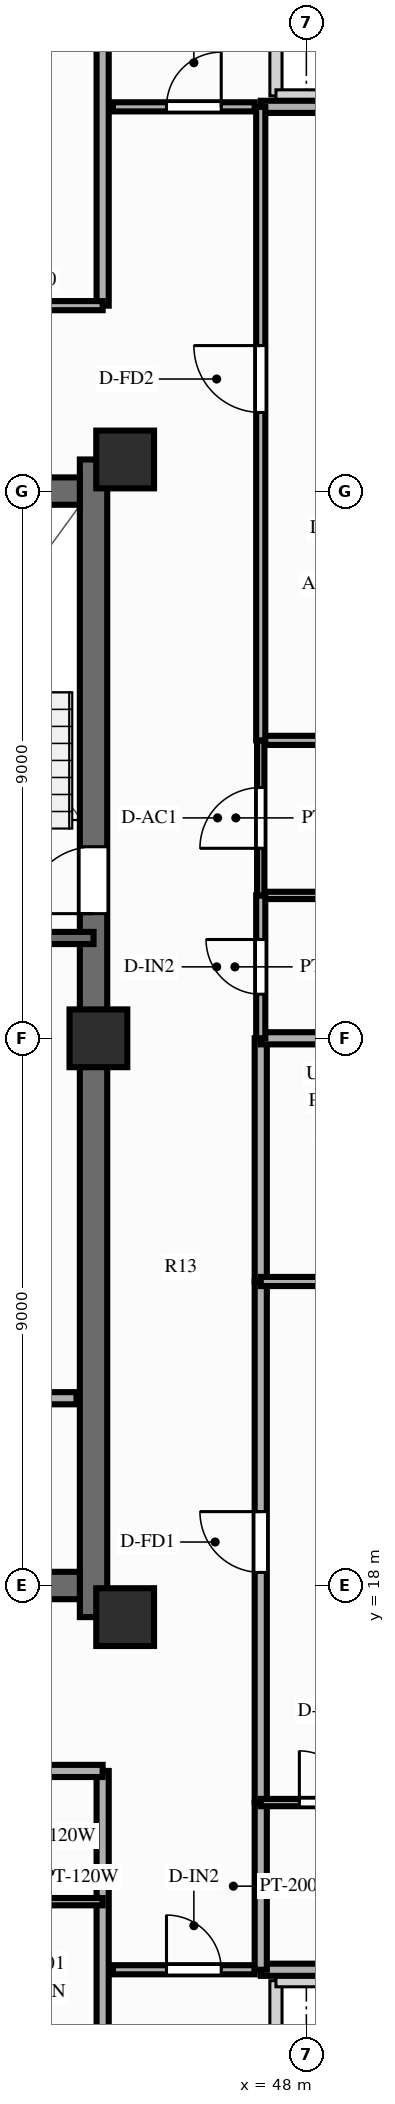
"""IFC4 building model, lengths in metres.
Left out: names, types, materials, properties, quantities, classifications, styles, units other than length and angle.
Written with IfcOpenShell. Run it as: python <this file> out.ifc"""

import sys

from ifc_helpers import new_model, si_unit, direction, frame, frame_2d, origin, origin_2d, place, context, subcontext, project, spatial, rectangle, extrude, source, transform, mapped, element, fill, save


model = new_model("IFC4")
c1 = context("Model", 3, precision=1e-05, world=origin(), true_north=direction((0.0, 1.0)))
c2 = subcontext(c1, "Body", "Model", "MODEL_VIEW")
j1 = project(units=[si_unit("LENGTHUNIT", "METRE"), si_unit("PLANEANGLEUNIT", "RADIAN")], contexts=[c1])
p1 = place(None, origin())
s1 = spatial("IfcSite", under=j1, at=p1, CompositionType="ELEMENT")
p2 = place(p1, origin())
s2 = spatial("IfcBuilding", under=s1, at=p2, CompositionType="ELEMENT")
p3 = place(p2, frame((0.0, 0.0, 246.0)))
s3 = spatial("IfcBuildingStorey", under=s2, at=p3, CompositionType="ELEMENT", Elevation=246.0)
p4 = place(p3, frame((44.5, 17.48, 0.0), z_axis=(0.0, 0.0, 1.0), x_axis=(0.0, 1.0, 0.0)))
e1 = element("IfcWall", 1, at=p4, inside=s3, PredefinedType="SHEAR", context=c2, shape_type="SweptSolid", body=[
    extrude(rectangle(XDim=19.04, YDim=0.45, at=frame_2d((9.52, 0.0))), origin(), (0.0, 0.0, 1.0), 3.0),
])
p5 = place(p4, frame((12.67, 0.0, 0.0), z_axis=(0.0, 0.0, 1.0), x_axis=(-1.0, 0.0, 0.0)))
e2 = element("IfcOpeningElement", 2, at=p5, cuts=e1, PredefinedType="OPENING", context=c2, shape_type="SweptSolid", body=[
    extrude(rectangle(XDim=1.1, YDim=2.15, at=frame_2d((0.55, 1.075))), frame((0.0, 0.237, 0.0), z_axis=(0.0, -1.0, 0.0), x_axis=(1.0, 0.0, 0.0)), (0.0, 0.0, 1.0), 0.474),
])
p6 = place(p3, frame((31.725, 18.0, 0.0), z_axis=(0.0, 0.0, 1.0), x_axis=(1.0, 0.0, 0.0)))
e3 = element("IfcWall", 3, at=p6, inside=s3, PredefinedType="SHEAR", context=c2, shape_type="SweptSolid", body=[
    extrude(rectangle(XDim=12.55, YDim=0.45, at=frame_2d((6.275, 0.0))), origin(), (0.0, 0.0, 1.0), 3.0),
])
p7 = place(p3, frame((31.725, 36.0, 0.0), z_axis=(0.0, 0.0, 1.0), x_axis=(1.0, 0.0, 0.0)))
e4 = element("IfcWall", 4, at=p7, inside=s3, PredefinedType="SHEAR", context=c2, shape_type="SweptSolid", body=[
    extrude(rectangle(XDim=12.55, YDim=0.45, at=frame_2d((6.275, 0.0))), origin(), (0.0, 0.0, 1.0), 3.0),
])
p8 = place(p7, frame((5.225, 0.0, 0.0), z_axis=(0.0, 0.0, 1.0), x_axis=(-1.0, 0.0, 0.0)))
e5 = element("IfcOpeningElement", 5, at=p8, cuts=e4, PredefinedType="OPENING", context=c2, shape_type="SweptSolid", body=[
    extrude(rectangle(XDim=1.4, YDim=2.15, at=frame_2d((0.7, 1.075))), frame((0.0, 0.237, 0.0), z_axis=(0.0, -1.0, 0.0), x_axis=(1.0, 0.0, 0.0)), (0.0, 0.0, 1.0), 0.474),
])
m1 = source(origin(), c2, "Body", "SweptSolid", [
    extrude(rectangle(XDim=0.95, YDim=0.95, at=origin_2d()), origin(), (0.0, 0.0, 1.0), 3.0),
])
for number, where, z_axis, x_axis in (
    (6, (45.02, 17.48, 0.0), (0.0, 0.0, 1.0), (1.0, 0.0, 0.0)),
    (7, (45.02, 36.52, 0.0), (0.0, 0.0, 1.0), (1.0, 0.0, 0.0)),
    (8, (44.58, 27.0, 0.0), (0.0, 0.0, 1.0), (1.0, 0.0, 0.0)),
):
    element("IfcColumn", number, at=place(p3, frame(where, z_axis=z_axis, x_axis=x_axis)), inside=s3, PredefinedType="COLUMN", context=c2, shape_type="MappedRepresentation", body=[
        mapped(m1, transform((0.0, 0.0, 0.0), scale=1.0)),
    ])
p9 = place(p3, frame((42.88, 21.08, 0.0), z_axis=(0.0, 0.0, 1.0), x_axis=(1.0, 0.0, 0.0)))
e9 = element("IfcWall", 9, at=p9, inside=s3, PredefinedType="PARTITIONING", context=c2, shape_type="SweptSolid", body=[
    extrude(rectangle(XDim=1.34, YDim=0.2, at=frame_2d((0.67, 0.0))), origin(), (0.0, 0.0, 1.0), 2.74),
])
p10 = place(p3, frame((40.57, 28.65, 0.0), z_axis=(0.0, 0.0, 1.0), x_axis=(1.0, 0.0, 0.0)))
e10 = element("IfcWall", 10, at=p10, inside=s3, PredefinedType="SOLIDWALL", context=c2, shape_type="SweptSolid", body=[
    extrude(rectangle(XDim=3.93, YDim=0.2, at=frame_2d((1.965, 0.0))), origin(), (0.0, 0.0, 1.0), 2.74),
])
p11 = place(p3, frame((44.82, 11.68, 0.0), z_axis=(0.0, 0.0, 1.0), x_axis=(1.0, 0.0, 0.0)))
e11 = element("IfcWall", 11, at=p11, inside=s3, PredefinedType="PARTITIONING", context=c2, shape_type="SweptSolid", body=[
    extrude(rectangle(XDim=2.33, YDim=0.15, at=frame_2d((1.165, 0.0))), origin(), (0.0, 0.0, 1.0), 2.74),
])
p12 = place(p11, frame((0.88, 0.0, 0.0)))
e12 = element("IfcOpeningElement", 12, at=p12, cuts=e11, PredefinedType="OPENING", context=c2, shape_type="SweptSolid", body=[
    extrude(rectangle(XDim=0.9, YDim=2.1, at=frame_2d((0.45, 1.05))), frame((0.0, 0.087, 0.0), z_axis=(0.0, -1.0, 0.0), x_axis=(1.0, 0.0, 0.0)), (0.0, 0.0, 1.0), 0.174),
])
p13 = place(p3, frame((44.82, 42.32, 0.0), z_axis=(0.0, 0.0, 1.0), x_axis=(1.0, 0.0, 0.0)))
e13 = element("IfcWall", 13, at=p13, inside=s3, PredefinedType="PARTITIONING", context=c2, shape_type="SweptSolid", body=[
    extrude(rectangle(XDim=2.33, YDim=0.15, at=frame_2d((1.165, 0.0))), origin(), (0.0, 0.0, 1.0), 2.74),
])
p14 = place(p13, frame((0.88, 0.0, 0.0)))
e14 = element("IfcOpeningElement", 14, at=p14, cuts=e13, PredefinedType="OPENING", context=c2, shape_type="SweptSolid", body=[
    extrude(rectangle(XDim=0.9, YDim=2.1, at=frame_2d((0.45, 1.05))), frame((0.0, 0.087, 0.0), z_axis=(0.0, -1.0, 0.0), x_axis=(1.0, 0.0, 0.0)), (0.0, 0.0, 1.0), 0.174),
])
p15 = place(p3, frame((44.65, 14.95, 0.0), z_axis=(0.0, 0.0, 1.0), x_axis=(0.0, -1.0, 0.0)))
e15 = element("IfcWall", 15, at=p15, inside=s3, PredefinedType="PARTITIONING", context=c2, shape_type="SweptSolid", body=[
    extrude(rectangle(XDim=8.8, YDim=0.2, at=frame_2d((4.4, 0.0))), origin(), (0.0, 0.0, 1.0), 2.39),
])
p16 = place(p3, frame((41.8, 14.95, 0.0), z_axis=(0.0, 0.0, 1.0), x_axis=(1.0, 0.0, 0.0)))
e16 = element("IfcWall", 16, at=p16, inside=s3, PredefinedType="PARTITIONING", context=c2, shape_type="SweptSolid", body=[
    extrude(rectangle(XDim=2.85, YDim=0.2, at=frame_2d((1.425, 0.0))), origin(), (0.0, 0.0, 1.0), 2.74),
])
p17 = place(p3, frame((41.8, 12.8, 0.0), z_axis=(0.0, 0.0, 1.0), x_axis=(1.0, 0.0, 0.0)))
e17 = element("IfcWall", 17, at=p17, inside=s3, PredefinedType="PARTITIONING", context=c2, shape_type="SweptSolid", body=[
    extrude(rectangle(XDim=2.85, YDim=0.12, at=frame_2d((1.425, 0.0))), origin(), (0.0, 0.0, 1.0), 2.74),
])
p18 = place(p3, frame((44.65, 39.05, 0.0), z_axis=(0.0, 0.0, 1.0), x_axis=(0.0, 1.0, 0.0)))
e18 = element("IfcWall", 18, at=p18, inside=s3, PredefinedType="PARTITIONING", context=c2, shape_type="SweptSolid", body=[
    extrude(rectangle(XDim=8.8, YDim=0.2, at=frame_2d((4.4, 0.0))), origin(), (0.0, 0.0, 1.0), 2.39),
])
p19 = place(p3, frame((39.075, 39.05, 0.0), z_axis=(0.0, 0.0, 1.0), x_axis=(1.0, 0.0, 0.0)))
e19 = element("IfcWall", 19, at=p19, inside=s3, PredefinedType="PARTITIONING", context=c2, shape_type="SweptSolid", body=[
    extrude(rectangle(XDim=5.575, YDim=0.15, at=frame_2d((2.788, 0.0))), origin(), (0.0, 0.0, 1.0), 2.74),
])
p20 = place(p19, frame((2.238, 0.0, 0.0)))
e20 = element("IfcOpeningElement", 20, at=p20, cuts=e19, PredefinedType="OPENING", context=c2, shape_type="SweptSolid", body=[
    extrude(rectangle(XDim=1.1, YDim=2.15, at=frame_2d((0.55, 1.075))), frame((0.0, 0.087, 0.0), z_axis=(0.0, -1.0, 0.0), x_axis=(1.0, 0.0, 0.0)), (0.0, 0.0, 1.0), 0.174),
])
for number, where, z_axis, x_axis in (
    (21, (47.25, 11.68, 0.0), (0.0, 0.0, 1.0), (1.0, 0.0, 0.0)),
    (22, (47.25, 42.32, 0.0), (0.0, 0.0, 1.0), (1.0, 0.0, 0.0)),
):
    element("IfcWall", number, at=place(p3, frame(where, z_axis=z_axis, x_axis=x_axis)), inside=s3, PredefinedType="PARTITIONING", context=c2, shape_type="SweptSolid", body=[
        extrude(rectangle(XDim=5.6, YDim=0.2, at=frame_2d((2.8, 0.0))), origin(), (0.0, 0.0, 1.0), 2.74),
    ])
p21 = place(p3, frame((47.25, 11.68, 0.0), z_axis=(0.0, 0.0, 1.0), x_axis=(0.0, 1.0, 0.0)))
e23 = element("IfcWall", 23, at=p21, inside=s3, PredefinedType="PARTITIONING", context=c2, shape_type="SweptSolid", body=[
    extrude(rectangle(XDim=2.75, YDim=0.2, at=frame_2d((1.375, 0.0))), origin(), (0.0, 0.0, 1.0), 2.74),
])
p22 = place(p3, frame((47.25, 14.43, 0.0), z_axis=(0.0, 0.0, 1.0), x_axis=(0.0, 1.0, 0.0)))
e24 = element("IfcWall", 24, at=p22, inside=s3, PredefinedType="PARTITIONING", context=c2, shape_type="SweptSolid", body=[
    extrude(rectangle(XDim=8.57, YDim=0.2, at=frame_2d((4.285, 0.0))), origin(), (0.0, 0.0, 1.0), 2.74),
])
p23 = place(p22, frame((3.785, 0.0, 0.0)))
e25 = element("IfcOpeningElement", 25, at=p23, cuts=e24, PredefinedType="OPENING", context=c2, shape_type="SweptSolid", body=[
    extrude(rectangle(XDim=1.0, YDim=2.15, at=frame_2d((0.5, 1.075))), frame((0.0, 0.112, 0.0), z_axis=(0.0, -1.0, 0.0), x_axis=(1.0, 0.0, 0.0)), (0.0, 0.0, 1.0), 0.224),
])
p24 = place(p3, frame((47.25, 23.0, 0.0), z_axis=(0.0, 0.0, 1.0), x_axis=(0.0, 1.0, 0.0)))
e26 = element("IfcWall", 26, at=p24, inside=s3, PredefinedType="PARTITIONING", context=c2, shape_type="SweptSolid", body=[
    extrude(rectangle(XDim=4.0, YDim=0.2, at=frame_2d((2.0, 0.0))), origin(), (0.0, 0.0, 1.0), 2.74),
])
p25 = place(p3, frame((47.25, 14.43, 0.0), z_axis=(0.0, 0.0, 1.0), x_axis=(1.0, 0.0, 0.0)))
e27 = element("IfcWall", 27, at=p25, inside=s3, PredefinedType="PARTITIONING", context=c2, shape_type="SweptSolid", body=[
    extrude(rectangle(XDim=2.12, YDim=0.12, at=frame_2d((1.06, 0.0))), origin(), (0.0, 0.0, 1.0), 2.74),
])
p26 = place(p25, frame((0.635, 0.0, 0.0)))
e28 = element("IfcOpeningElement", 28, at=p26, cuts=e27, PredefinedType="OPENING", context=c2, shape_type="SweptSolid", body=[
    extrude(rectangle(XDim=0.85, YDim=2.05, at=frame_2d((0.425, 1.025))), frame((0.0, 0.072, 0.0), z_axis=(0.0, -1.0, 0.0), x_axis=(1.0, 0.0, 0.0)), (0.0, 0.0, 1.0), 0.144),
])
p27 = place(p3, frame((47.25, 23.0, 0.0), z_axis=(0.0, 0.0, 1.0), x_axis=(1.0, 0.0, 0.0)))
e29 = element("IfcWall", 29, at=p27, inside=s3, PredefinedType="PARTITIONING", context=c2, shape_type="SweptSolid", body=[
    extrude(rectangle(XDim=2.85, YDim=0.15, at=frame_2d((1.425, 0.0))), origin(), (0.0, 0.0, 1.0), 2.74),
])
p28 = place(p27, frame((0.975, 0.0, 0.0)))
e30 = element("IfcOpeningElement", 30, at=p28, cuts=e29, PredefinedType="OPENING", context=c2, shape_type="SweptSolid", body=[
    extrude(rectangle(XDim=0.9, YDim=2.1, at=frame_2d((0.45, 1.05))), frame((0.0, 0.087, 0.0), z_axis=(0.0, -1.0, 0.0), x_axis=(1.0, 0.0, 0.0)), (0.0, 0.0, 1.0), 0.174),
])
p29 = place(p3, frame((47.25, 27.0, 0.0), z_axis=(0.0, 0.0, 1.0), x_axis=(1.0, 0.0, 0.0)))
e31 = element("IfcWall", 31, at=p29, inside=s3, PredefinedType="PARTITIONING", context=c2, shape_type="SweptSolid", body=[
    extrude(rectangle(XDim=5.6, YDim=0.2, at=frame_2d((2.8, 0.0))), origin(), (0.0, 0.0, 1.0), 2.74),
])
p30 = place(p3, frame((47.25, 29.35, 0.0), z_axis=(0.0, 0.0, 1.0), x_axis=(1.0, 0.0, 0.0)))
e32 = element("IfcWall", 32, at=p30, inside=s3, PredefinedType="PARTITIONING", context=c2, shape_type="SweptSolid", body=[
    extrude(rectangle(XDim=3.6, YDim=0.12, at=frame_2d((1.8, 0.0))), origin(), (0.0, 0.0, 1.0), 2.74),
])
p31 = place(p3, frame((47.25, 31.9, 0.0), z_axis=(0.0, 0.0, 1.0), x_axis=(1.0, 0.0, 0.0)))
e33 = element("IfcWall", 33, at=p31, inside=s3, PredefinedType="PARTITIONING", context=c2, shape_type="SweptSolid", body=[
    extrude(rectangle(XDim=3.6, YDim=0.15, at=frame_2d((1.8, 0.0))), origin(), (0.0, 0.0, 1.0), 2.39),
])
p32 = place(p3, frame((47.25, 27.0, 0.0), z_axis=(0.0, 0.0, 1.0), x_axis=(0.0, 1.0, 0.0)))
e34 = element("IfcWall", 34, at=p32, inside=s3, PredefinedType="PARTITIONING", context=c2, shape_type="SweptSolid", body=[
    extrude(rectangle(XDim=2.35, YDim=0.15, at=frame_2d((1.175, 0.0))), origin(), (0.0, 0.0, 1.0), 2.74),
])
p33 = place(p32, frame((0.725, 0.0, 0.0)))
e35 = element("IfcOpeningElement", 35, at=p33, cuts=e34, PredefinedType="OPENING", context=c2, shape_type="SweptSolid", body=[
    extrude(rectangle(XDim=0.9, YDim=2.1, at=frame_2d((0.45, 1.05))), frame((0.0, 0.087, 0.0), z_axis=(0.0, -1.0, 0.0), x_axis=(1.0, 0.0, 0.0)), (0.0, 0.0, 1.0), 0.174),
])
p34 = place(p3, frame((47.25, 29.35, 0.0), z_axis=(0.0, 0.0, 1.0), x_axis=(0.0, 1.0, 0.0)))
e36 = element("IfcWall", 36, at=p34, inside=s3, PredefinedType="PARTITIONING", context=c2, shape_type="SweptSolid", body=[
    extrude(rectangle(XDim=2.55, YDim=0.12, at=frame_2d((1.275, 0.0))), origin(), (0.0, 0.0, 1.0), 2.74),
])
p35 = place(p34, frame((0.775, 0.0, 0.0)))
e37 = element("IfcOpeningElement", 37, at=p35, cuts=e36, PredefinedType="OPENING", context=c2, shape_type="SweptSolid", body=[
    extrude(rectangle(XDim=1.0, YDim=2.1, at=frame_2d((0.5, 1.05))), frame((0.0, 0.072, 0.0), z_axis=(0.0, -1.0, 0.0), x_axis=(1.0, 0.0, 0.0)), (0.0, 0.0, 1.0), 0.144),
])
p36 = place(p3, frame((47.25, 31.9, 0.0), z_axis=(0.0, 0.0, 1.0), x_axis=(0.0, 1.0, 0.0)))
e38 = element("IfcWall", 38, at=p36, inside=s3, PredefinedType="PARTITIONING", context=c2, shape_type="SweptSolid", body=[
    extrude(rectangle(XDim=10.42, YDim=0.15, at=frame_2d((5.21, 0.0))), origin(), (0.0, 0.0, 1.0), 2.74),
])
p37 = place(p36, frame((5.393, 0.0, 0.0)))
e39 = element("IfcOpeningElement", 39, at=p37, cuts=e38, PredefinedType="OPENING", context=c2, shape_type="SweptSolid", body=[
    extrude(rectangle(XDim=1.1, YDim=2.15, at=frame_2d((0.55, 1.075))), frame((0.0, 0.087, 0.0), z_axis=(0.0, -1.0, 0.0), x_axis=(1.0, 0.0, 0.0)), (0.0, 0.0, 1.0), 0.174),
])
m2 = source(origin(), c2, "Body", "SweptSolid", [
    extrude(rectangle(XDim=1.1, YDim=2.15, at=frame_2d((0.55, 1.075))), frame((0.0, 0.025, 0.0), z_axis=(0.0, -1.0, 0.0), x_axis=(1.0, 0.0, 0.0)), (0.0, 0.0, 1.0), 0.05),
])
p38 = place(p5, origin())
e40 = element("IfcDoor", 40, at=p38, inside=s3, OperationType="SINGLE_SWING_RIGHT", PredefinedType="DOOR", context=c2, shape_type="MappedRepresentation", body=[
    mapped(m2, transform((0.0, 0.0, 0.0), scale=1.0)),
])
fill(e2, e40)
m3 = source(origin(), c2, "Body", "SweptSolid", [
    extrude(rectangle(XDim=0.9, YDim=2.1, at=frame_2d((0.45, 1.05))), frame((0.0, 0.025, 0.0), z_axis=(0.0, -1.0, 0.0), x_axis=(1.0, 0.0, 0.0)), (0.0, 0.0, 1.0), 0.05),
])
p39 = place(p12, origin())
e41 = element("IfcDoor", 41, at=p39, inside=s3, OperationType="SINGLE_SWING_LEFT", PredefinedType="DOOR", context=c2, shape_type="MappedRepresentation", body=[
    mapped(m3, transform((0.0, 0.0, 0.0), scale=1.0)),
])
fill(e12, e41)
p40 = place(p14, origin())
e42 = element("IfcDoor", 42, at=p40, inside=s3, OperationType="SINGLE_SWING_RIGHT", PredefinedType="DOOR", context=c2, shape_type="MappedRepresentation", body=[
    mapped(m3, transform((0.0, 0.0, 0.0), scale=1.0)),
])
fill(e14, e42)
m4 = source(origin(), c2, "Body", "SweptSolid", [
    extrude(rectangle(XDim=1.0, YDim=2.15, at=frame_2d((0.5, 1.075))), frame((0.0, 0.025, 0.0), z_axis=(0.0, -1.0, 0.0), x_axis=(1.0, 0.0, 0.0)), (0.0, 0.0, 1.0), 0.05),
])
p41 = place(p23, origin())
e43 = element("IfcDoor", 43, at=p41, inside=s3, OperationType="SINGLE_SWING_RIGHT", PredefinedType="DOOR", context=c2, shape_type="MappedRepresentation", body=[
    mapped(m4, transform((0.0, 0.0, 0.0), scale=1.0)),
])
fill(e25, e43)
m5 = source(origin(), c2, "Body", "SweptSolid", [
    extrude(rectangle(XDim=0.85, YDim=2.05, at=frame_2d((0.425, 1.025))), frame((0.0, 0.025, 0.0), z_axis=(0.0, -1.0, 0.0), x_axis=(1.0, 0.0, 0.0)), (0.0, 0.0, 1.0), 0.05),
])
p42 = place(p26, origin())
e44 = element("IfcDoor", 44, at=p42, inside=s3, OperationType="SINGLE_SWING_LEFT", PredefinedType="DOOR", context=c2, shape_type="MappedRepresentation", body=[
    mapped(m5, transform((0.0, 0.0, 0.0), scale=1.0)),
])
fill(e28, e44)
p43 = place(p33, origin())
e45 = element("IfcDoor", 45, at=p43, inside=s3, OperationType="SINGLE_SWING_RIGHT", PredefinedType="DOOR", context=c2, shape_type="MappedRepresentation", body=[
    mapped(m3, transform((0.0, 0.0, 0.0), scale=1.0)),
])
fill(e35, e45)
m6 = source(origin(), c2, "Body", "SweptSolid", [
    extrude(rectangle(XDim=1.0, YDim=2.1, at=frame_2d((0.5, 1.05))), frame((0.0, 0.025, 0.0), z_axis=(0.0, -1.0, 0.0), x_axis=(1.0, 0.0, 0.0)), (0.0, 0.0, 1.0), 0.05),
])
p44 = place(p35, origin())
e46 = element("IfcDoor", 46, at=p44, inside=s3, OperationType="SINGLE_SWING_LEFT", PredefinedType="DOOR", context=c2, shape_type="MappedRepresentation", body=[
    mapped(m6, transform((0.0, 0.0, 0.0), scale=1.0)),
])
fill(e37, e46)
p45 = place(p37, origin())
e47 = element("IfcDoor", 47, at=p45, inside=s3, OperationType="SINGLE_SWING_RIGHT", PredefinedType="DOOR", context=c2, shape_type="MappedRepresentation", body=[
    mapped(m2, transform((0.0, 0.0, 0.0), scale=1.0)),
])
fill(e39, e47)
save(model, sys.argv[1])
